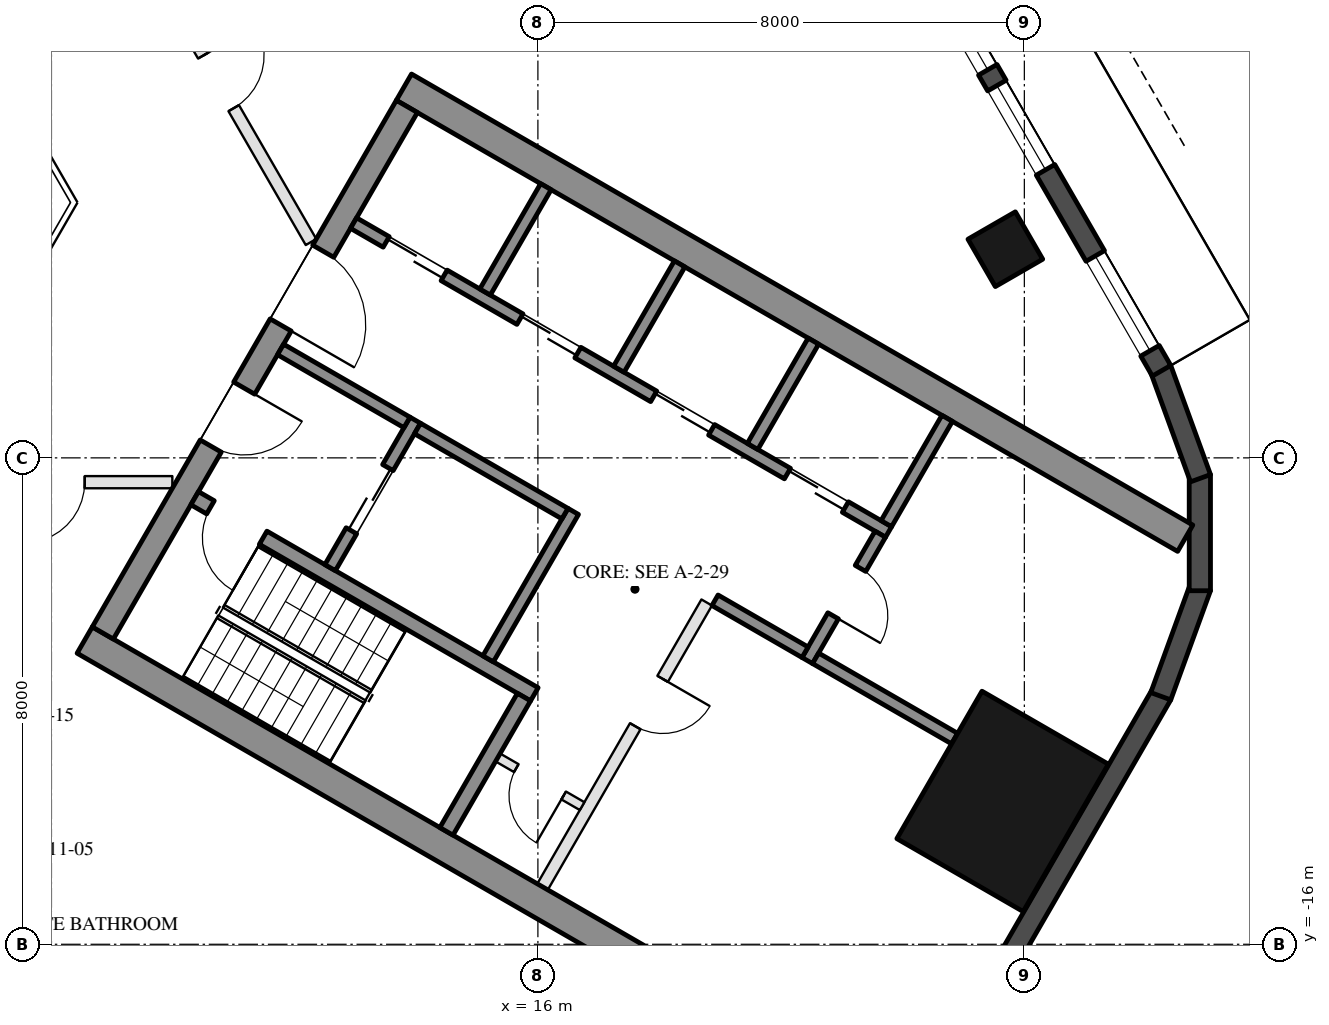
"""IFC4 building model, lengths in metres.
Left out: names, types, materials, properties, quantities, classifications, styles, units other than length and angle.
Written with IfcOpenShell. Run it as: python <this file> out.ifc"""

import sys

from ifc_helpers import new_model, si_unit, direction, frame, frame_2d, origin, origin_2d, place, context, subcontext, project, spatial, rectangle, hollow_rectangle, extrude, element, fill, save


model = new_model("IFC4")
c1 = context("Model", 3, precision=1e-05, world=origin(), true_north=direction((0.0, 1.0)))
c2 = subcontext(c1, "Body", "Model", "MODEL_VIEW")
j1 = project(units=[si_unit("LENGTHUNIT", "METRE"), si_unit("PLANEANGLEUNIT", "RADIAN")], contexts=[c1])
p1 = place(None, origin())
s1 = spatial("IfcSite", under=j1, at=p1, CompositionType="ELEMENT")
p2 = place(p1, origin())
s2 = spatial("IfcBuilding", under=s1, at=p2, CompositionType="ELEMENT")
p3 = place(p2, frame((0.0, 0.0, 127.9)))
s3 = spatial("IfcBuildingStorey", under=s2, at=p3, CompositionType="ELEMENT", Elevation=127.9)
p4 = place(p3, frame((23.688, -4.568, 0.0), z_axis=(0.0, 0.0, 1.0), x_axis=(-0.5, 0.866025403784, 0.0)))
e1 = element("IfcColumn", 1, at=p4, inside=s3, PredefinedType="COLUMN", context=c2, shape_type="SweptSolid", body=[
    extrude(hollow_rectangle(XDim=0.9, YDim=0.9, WallThickness=0.04, at=origin_2d()), origin(), (0.0, 0.0, 1.0), 3.7),
])
p5 = place(p3, frame((23.643, -13.65, 0.0), z_axis=(0.0, 0.0, 1.0), x_axis=(0.5, 0.866025403784, 0.0)))
e2 = element("IfcColumn", 2, at=p5, inside=s3, PredefinedType="COLUMN", context=c2, shape_type="SweptSolid", body=[
    extrude(hollow_rectangle(XDim=2.8, YDim=2.4, WallThickness=0.07, at=origin_2d()), origin(), (0.0, 0.0, 1.0), 3.7),
])
p6 = place(p3, frame((23.427, -16.792, 0.0), z_axis=(0.0, 0.0, 1.0), x_axis=(0.500018773155, 0.866014564827, 0.0)))
e3 = element("IfcWall", 3, at=p6, inside=s3, PredefinedType="SOLIDWALL", context=c2, shape_type="SweptSolid", body=[
    extrude(rectangle(XDim=5.658, YDim=0.35, at=frame_2d((2.829, 0.0))), origin(), (0.0, 0.0, 1.0), 3.45),
])
for number, where, z_axis, x_axis in (
    (4, (26.244, -11.92, 0.0), (0.0, 0.0, 1.0), (0.342, 0.94, 0.0)),
    (5, (26.886, -10.185, 0.0), (0.0, 0.0, 1.0), (0.0, 1.0, 0.0)),
    (6, (26.897, -8.335, 0.0), (0.0, 0.0, 1.0), (-0.342, 0.94, 0.0)),
):
    element("IfcWall", number, at=place(p3, frame(where, z_axis=z_axis, x_axis=x_axis)), inside=s3, PredefinedType="SOLIDWALL", context=c2, shape_type="SweptSolid", body=[
        extrude(rectangle(XDim=1.91, YDim=0.35, at=frame_2d((0.955, 0.0))), origin(), (0.0, 0.0, 1.0), 3.45),
    ])
p7 = place(p3, frame((26.257, -6.567, 0.0), z_axis=(0.0, 0.0, 1.0), x_axis=(-0.500023526245, 0.866011820475, 0.0)))
e7 = element("IfcWall", 7, at=p7, inside=s3, PredefinedType="SOLIDWALL", context=c2, shape_type="SweptSolid", body=[
    extrude(rectangle(XDim=11.816, YDim=0.35, at=frame_2d((5.908, 0.0))), origin(), (0.0, 0.0, 1.0), 3.45),
])
p8 = place(p7, frame((0.38, 0.0, 0.3)))
e8 = element("IfcOpeningElement", 8, at=p8, cuts=e7, PredefinedType="OPENING", context=c2, shape_type="SweptSolid", body=[
    extrude(rectangle(XDim=1.8, YDim=2.65, at=frame_2d((0.9, 1.325))), frame((0.0, 0.185, 0.0), z_axis=(0.0, -1.0, 0.0), x_axis=(1.0, 0.0, 0.0)), (0.0, 0.0, 1.0), 0.37),
])
p9 = place(p7, frame((7.716, 0.0, 0.0)))
e9 = element("IfcOpeningElement", 9, at=p9, cuts=e7, PredefinedType="OPENING", context=c2, shape_type="SweptSolid", body=[
    extrude(rectangle(XDim=2.4, YDim=2.4, at=frame_2d((1.2, 1.2))), frame((0.0, 0.185, 0.0), z_axis=(0.0, -1.0, 0.0), x_axis=(1.0, 0.0, 0.0)), (0.0, 0.0, 1.0), 0.37),
])
p10 = place(p7, frame((3.816, 0.0, 0.3)))
e10 = element("IfcOpeningElement", 10, at=p10, cuts=e7, PredefinedType="OPENING", context=c2, shape_type="SweptSolid", body=[
    extrude(rectangle(XDim=1.6, YDim=2.65, at=frame_2d((0.8, 1.325))), frame((0.0, 0.185, 0.0), z_axis=(0.0, -1.0, 0.0), x_axis=(1.0, 0.0, 0.0)), (0.0, 0.0, 1.0), 0.37),
])
p11 = place(p7, frame((5.716, 0.0, 0.3)))
e11 = element("IfcOpeningElement", 11, at=p11, cuts=e7, PredefinedType="OPENING", context=c2, shape_type="SweptSolid", body=[
    extrude(rectangle(XDim=1.6, YDim=2.65, at=frame_2d((0.8, 1.325))), frame((0.0, 0.185, 0.0), z_axis=(0.0, -1.0, 0.0), x_axis=(1.0, 0.0, 0.0)), (0.0, 0.0, 1.0), 0.37),
])
for number, where, z_axis, x_axis in (
    (12, (8.547, -10.997, 0.0), (0.0, 0.0, 1.0), (0.866, -0.5, 0.0)),
    (13, (13.797, -1.903, 0.0), (0.0, 0.0, 1.0), (0.866, -0.5, 0.0)),
):
    element("IfcWall", number, at=place(p3, frame(where, z_axis=z_axis, x_axis=x_axis)), inside=s3, PredefinedType="SHEAR", context=c2, shape_type="SweptSolid", body=[
        extrude(rectangle(XDim=14.837, YDim=0.5, at=frame_2d((7.418, 0.0))), origin(), (0.0, 0.0, 1.0), 3.45),
    ])
p12 = place(p3, frame((8.845, -10.88, 0.0), z_axis=(0.0, 0.0, 1.0), x_axis=(0.500004234368, 0.866022959057, 0.0)))
e14 = element("IfcWall", 14, at=p12, inside=s3, PredefinedType="SHEAR", context=c2, shape_type="SweptSolid", body=[
    extrude(rectangle(XDim=10.0, YDim=0.4, at=frame_2d((5.0, 0.0))), origin(), (0.0, 0.0, 1.0), 3.45),
])
p13 = place(p12, frame((3.55, 0.0, 0.0)))
e15 = element("IfcOpeningElement", 15, at=p13, cuts=e14, PredefinedType="OPENING", context=c2, shape_type="SweptSolid", body=[
    extrude(rectangle(XDim=1.1, YDim=2.1, at=frame_2d((0.55, 1.05))), frame((0.0, 0.21, 0.0), z_axis=(0.0, -1.0, 0.0), x_axis=(1.0, 0.0, 0.0)), (0.0, 0.0, 1.0), 0.42),
])
p14 = place(p12, frame((5.85, 0.0, 0.0)))
e16 = element("IfcOpeningElement", 16, at=p14, cuts=e14, PredefinedType="OPENING", context=c2, shape_type="SweptSolid", body=[
    extrude(rectangle(XDim=1.4, YDim=2.1, at=frame_2d((0.7, 1.05))), frame((0.0, 0.21, 0.0), z_axis=(0.0, -1.0, 0.0), x_axis=(1.0, 0.0, 0.0)), (0.0, 0.0, 1.0), 0.42),
])
p15 = place(p3, frame((10.356, -8.664, 0.0), z_axis=(0.0, 0.0, 1.0), x_axis=(0.866028629588, -0.499994412703, 0.0)))
e17 = element("IfcWall", 17, at=p15, inside=s3, PredefinedType="SHEAR", context=c2, shape_type="SweptSolid", body=[
    extrude(rectangle(XDim=6.45, YDim=0.25, at=frame_2d((3.225, 0.0))), origin(), (0.0, 0.0, 1.0), 3.45),
])
p16 = place(p15, frame((0.3, 0.0, 0.0)))
e18 = element("IfcOpeningElement", 18, at=p16, cuts=e17, PredefinedType="OPENING", context=c2, shape_type="SweptSolid", body=[
    extrude(rectangle(XDim=1.0, YDim=2.1, at=frame_2d((0.5, 1.05))), frame((0.0, 0.135, 0.0), z_axis=(0.0, -1.0, 0.0), x_axis=(1.0, 0.0, 0.0)), (0.0, 0.0, 1.0), 0.27),
])
p17 = place(p3, frame((14.496, -14.143, 0.0), z_axis=(0.0, 0.0, 1.0), x_axis=(0.500062241894, 0.865989465428, 0.0)))
e19 = element("IfcWall", 19, at=p17, inside=s3, PredefinedType="SHEAR", context=c2, shape_type="SweptSolid", body=[
    extrude(rectangle(XDim=2.55, YDim=0.25, at=frame_2d((1.275, 0.0))), origin(), (0.0, 0.0, 1.0), 3.45),
])
p18 = place(p3, frame((15.181, -11.305, 0.0), z_axis=(0.0, 0.0, 1.0), x_axis=(0.49994636267, 0.866056369097, 0.0)))
e20 = element("IfcWall", 20, at=p18, inside=s3, PredefinedType="SHEAR", context=c2, shape_type="SweptSolid", body=[
    extrude(rectangle(XDim=2.8, YDim=0.2, at=frame_2d((1.4, 0.0))), origin(), (0.0, 0.0, 1.0), 3.45),
])
p19 = place(p3, frame((12.583, -9.805, 0.0), z_axis=(0.0, 0.0, 1.0), x_axis=(0.49994636267, 0.866056369097, 0.0)))
e21 = element("IfcWall", 21, at=p19, inside=s3, PredefinedType="SHEAR", context=c2, shape_type="SweptSolid", body=[
    extrude(rectangle(XDim=2.8, YDim=0.2, at=frame_2d((1.4, 0.0))), origin(), (0.0, 0.0, 1.0), 3.45),
])
p20 = place(p19, frame((0.7, 0.0, 0.0)))
e22 = element("IfcOpeningElement", 22, at=p20, cuts=e21, PredefinedType="OPENING", context=c2, shape_type="SweptSolid", body=[
    extrude(rectangle(XDim=1.2, YDim=2.1, at=frame_2d((0.6, 1.05))), frame((0.0, 0.11, 0.0), z_axis=(0.0, -1.0, 0.0), x_axis=(1.0, 0.0, 0.0)), (0.0, 0.0, 1.0), 0.22),
])
p21 = place(p3, frame((11.768, -6.217, 0.0), z_axis=(0.0, 0.0, 1.0), x_axis=(0.866050077142, -0.499957262057, 0.0)))
e23 = element("IfcWall", 23, at=p21, inside=s3, PredefinedType="SHEAR", context=c2, shape_type="SweptSolid", body=[
    extrude(rectangle(XDim=2.4, YDim=0.2, at=frame_2d((1.2, 0.0))), origin(), (0.0, 0.0, 1.0), 3.45),
])
p22 = place(p3, frame((14.02, -7.517, 0.0), z_axis=(0.0, 0.0, 1.0), x_axis=(0.866034573852, -0.49998411664, 0.0)))
e24 = element("IfcWall", 24, at=p22, inside=s3, PredefinedType="SHEAR", context=c2, shape_type="SweptSolid", body=[
    extrude(rectangle(XDim=2.8, YDim=0.2, at=frame_2d((1.4, 0.0))), origin(), (0.0, 0.0, 1.0), 3.45),
])
p23 = place(p3, frame((12.968, -4.138, 0.0), z_axis=(0.0, 0.0, 1.0), x_axis=(0.866028328073, -0.49999493495, 0.0)))
e25 = element("IfcWall", 25, at=p23, inside=s3, PredefinedType="SHEAR", context=c2, shape_type="SweptSolid", body=[
    extrude(rectangle(XDim=10.16, YDim=0.2, at=frame_2d((5.08, 0.0))), origin(), (0.0, 0.0, 1.0), 3.45),
])
p24 = place(p23, frame((0.62, 0.0, 0.0)))
e26 = element("IfcOpeningElement", 26, at=p24, cuts=e25, PredefinedType="OPENING", context=c2, shape_type="SweptSolid", body=[
    extrude(rectangle(XDim=1.1, YDim=2.1, at=frame_2d((0.55, 1.05))), frame((0.0, 0.11, 0.0), z_axis=(0.0, -1.0, 0.0), x_axis=(1.0, 0.0, 0.0)), (0.0, 0.0, 1.0), 0.22),
])
p25 = place(p23, frame((3.16, 0.0, 0.0)))
e27 = element("IfcOpeningElement", 27, at=p25, cuts=e25, PredefinedType="OPENING", context=c2, shape_type="SweptSolid", body=[
    extrude(rectangle(XDim=1.1, YDim=2.1, at=frame_2d((0.55, 1.05))), frame((0.0, 0.11, 0.0), z_axis=(0.0, -1.0, 0.0), x_axis=(1.0, 0.0, 0.0)), (0.0, 0.0, 1.0), 0.22),
])
p26 = place(p23, frame((5.7, 0.0, 0.0)))
e28 = element("IfcOpeningElement", 28, at=p26, cuts=e25, PredefinedType="OPENING", context=c2, shape_type="SweptSolid", body=[
    extrude(rectangle(XDim=1.1, YDim=2.1, at=frame_2d((0.55, 1.05))), frame((0.0, 0.11, 0.0), z_axis=(0.0, -1.0, 0.0), x_axis=(1.0, 0.0, 0.0)), (0.0, 0.0, 1.0), 0.22),
])
p27 = place(p23, frame((8.24, 0.0, 0.0)))
e29 = element("IfcOpeningElement", 29, at=p27, cuts=e25, PredefinedType="OPENING", context=c2, shape_type="SweptSolid", body=[
    extrude(rectangle(XDim=1.1, YDim=2.1, at=frame_2d((0.55, 1.05))), frame((0.0, 0.11, 0.0), z_axis=(0.0, -1.0, 0.0), x_axis=(1.0, 0.0, 0.0)), (0.0, 0.0, 1.0), 0.22),
])
p28 = place(p3, frame((20.43, -11.333, 0.0), z_axis=(0.0, 0.0, 1.0), x_axis=(0.500001309137, 0.866024647952, 0.0)))
e30 = element("IfcWall", 30, at=p28, inside=s3, PredefinedType="SHEAR", context=c2, shape_type="SweptSolid", body=[
    extrude(rectangle(XDim=2.4, YDim=0.2, at=frame_2d((1.2, 0.0))), origin(), (0.0, 0.0, 1.0), 3.45),
])
p29 = place(p28, frame((0.85, 0.0, 0.0)))
e31 = element("IfcOpeningElement", 31, at=p29, cuts=e30, PredefinedType="OPENING", context=c2, shape_type="SweptSolid", body=[
    extrude(rectangle(XDim=0.9, YDim=2.1, at=frame_2d((0.45, 1.05))), frame((0.0, 0.11, 0.0), z_axis=(0.0, -1.0, 0.0), x_axis=(1.0, 0.0, 0.0)), (0.0, 0.0, 1.0), 0.22),
])
p30 = place(p3, frame((18.913, -10.342, 0.0), z_axis=(0.0, 0.0, 1.0), x_axis=(0.866038183914, -0.499977863513, 0.0)))
e32 = element("IfcWall", 32, at=p30, inside=s3, PredefinedType="SHEAR", context=c2, shape_type="SweptSolid", body=[
    extrude(rectangle(XDim=1.71, YDim=0.2, at=frame_2d((0.855, 0.0))), origin(), (0.0, 0.0, 1.0), 3.45),
])
for number, where, z_axis, x_axis in (
    (33, (15.131, -5.272, 0.0), (0.0, 0.0, 1.0), (0.5, 0.866, 0.0)),
    (34, (17.331, -6.542, 0.0), (0.0, 0.0, 1.0), (0.5, 0.866, 0.0)),
    (35, (19.531, -7.812, 0.0), (0.0, 0.0, 1.0), (0.5, 0.866, 0.0)),
    (36, (21.73, -9.082, 0.0), (0.0, 0.0, 1.0), (0.5, 0.866, 0.0)),
):
    element("IfcWall", number, at=place(p3, frame(where, z_axis=z_axis, x_axis=x_axis)), inside=s3, PredefinedType="SHEAR", context=c2, shape_type="SweptSolid", body=[
        extrude(rectangle(XDim=2.0, YDim=0.2, at=frame_2d((1.0, 0.0))), origin(), (0.0, 0.0, 1.0), 3.45),
    ])
p31 = place(p3, frame((20.567, -11.297, 0.0), z_axis=(0.0, 0.0, 1.0), x_axis=(0.866060851709, -0.499938597367, 0.0)))
e37 = element("IfcWall", 37, at=p31, inside=s3, PredefinedType="SHEAR", context=c2, shape_type="SweptSolid", body=[
    extrude(rectangle(XDim=2.64, YDim=0.2, at=frame_2d((1.32, 0.0))), origin(), (0.0, 0.0, 1.0), 3.45),
])
p32 = place(p3, frame((16.076, -15.055, 0.0), z_axis=(0.0, 0.0, 1.0), x_axis=(0.499995103361, 0.866028230842, 0.0)))
e38 = element("IfcWall", 38, at=p32, inside=s3, PredefinedType="PARTITIONING", context=c2, shape_type="SweptSolid", body=[
    extrude(rectangle(XDim=5.4, YDim=0.2, at=frame_2d((2.7, 0.0))), origin(), (0.0, 0.0, 1.0), 3.45),
])
p33 = place(p32, frame((3.05, 0.0, 0.0)))
e39 = element("IfcOpeningElement", 39, at=p33, cuts=e38, PredefinedType="OPENING", context=c2, shape_type="SweptSolid", body=[
    extrude(rectangle(XDim=0.9, YDim=2.1, at=frame_2d((0.45, 1.05))), frame((0.0, 0.11, 0.0), z_axis=(0.0, -1.0, 0.0), x_axis=(1.0, 0.0, 0.0)), (0.0, 0.0, 1.0), 0.22),
])
p34 = place(p3, frame((15.342, -12.928, 0.0), z_axis=(0.0, 0.0, 1.0), x_axis=(0.865989903783, -0.500061482766, 0.0)))
e40 = element("IfcWall", 40, at=p34, inside=s3, PredefinedType="PARTITIONING", context=c2, shape_type="SweptSolid", body=[
    extrude(rectangle(XDim=1.6, YDim=0.15, at=frame_2d((0.8, 0.0))), origin(), (0.0, 0.0, 1.0), 3.45),
])
p35 = place(p34, frame((0.35, 0.0, 0.0)))
e41 = element("IfcOpeningElement", 41, at=p35, cuts=e40, PredefinedType="OPENING", context=c2, shape_type="SweptSolid", body=[
    extrude(rectangle(XDim=0.9, YDim=2.1, at=frame_2d((0.45, 1.05))), frame((0.0, 0.085, 0.0), z_axis=(0.0, -1.0, 0.0), x_axis=(1.0, 0.0, 0.0)), (0.0, 0.0, 1.0), 0.17),
])
p36 = place(p3, frame((9.988, -8.4, 0.0), z_axis=(0.0, 0.0, 1.0), x_axis=(-1.0, 0.0, 0.0)))
e42 = element("IfcWall", 42, at=p36, inside=s3, PredefinedType="PARTITIONING", context=c2, shape_type="SweptSolid", body=[
    extrude(rectangle(XDim=3.883, YDim=0.2, at=frame_2d((1.941, 0.0))), origin(), (0.0, 0.0, 1.0), 2.76),
])
p37 = place(p36, frame((1.441, 0.0, 0.0)))
e43 = element("IfcOpeningElement", 43, at=p37, cuts=e42, PredefinedType="OPENING", context=c2, shape_type="SweptSolid", body=[
    extrude(rectangle(XDim=1.0, YDim=2.1, at=frame_2d((0.5, 1.05))), frame((0.0, 0.11, 0.0), z_axis=(0.0, -1.0, 0.0), x_axis=(1.0, 0.0, 0.0)), (0.0, 0.0, 1.0), 0.22),
])
p38 = place(p3, frame((9.226, 0.819, 0.0), z_axis=(0.0, 0.0, 1.0), x_axis=(0.500031571837, -0.866007175009, 0.0)))
e44 = element("IfcWall", 44, at=p38, inside=s3, PredefinedType="PARTITIONING", context=c2, shape_type="SweptSolid", body=[
    extrude(rectangle(XDim=6.084, YDim=0.2, at=frame_2d((3.042, 0.0))), origin(), (0.0, 0.0, 1.0), 2.76),
])
p39 = place(p38, frame((2.542, 0.0, 0.0)))
e45 = element("IfcOpeningElement", 45, at=p39, cuts=e44, PredefinedType="OPENING", context=c2, shape_type="SweptSolid", body=[
    extrude(rectangle(XDim=1.0, YDim=2.1, at=frame_2d((0.5, 1.05))), frame((0.0, 0.11, 0.0), z_axis=(0.0, -1.0, 0.0), x_axis=(1.0, 0.0, 0.0)), (0.0, 0.0, 1.0), 0.22),
])
p40 = place(p8, origin())
e46 = element("IfcWindow", 46, at=p40, inside=s3, PartitioningType="SINGLE_PANEL", PredefinedType="WINDOW", context=c2, shape_type="SweptSolid", body=[
    extrude(rectangle(XDim=1.8, YDim=2.65, at=frame_2d((0.9, 1.325))), frame((0.0, 0.03, 0.0), z_axis=(0.0, -1.0, 0.0), x_axis=(1.0, 0.0, 0.0)), (0.0, 0.0, 1.0), 0.06),
])
fill(e8, e46)
p41 = place(p10, origin())
e47 = element("IfcWindow", 47, at=p41, inside=s3, PartitioningType="SINGLE_PANEL", PredefinedType="WINDOW", context=c2, shape_type="SweptSolid", body=[
    extrude(rectangle(XDim=1.6, YDim=2.65, at=frame_2d((0.8, 1.325))), frame((0.0, 0.03, 0.0), z_axis=(0.0, -1.0, 0.0), x_axis=(1.0, 0.0, 0.0)), (0.0, 0.0, 1.0), 0.06),
])
fill(e10, e47)
p42 = place(p11, origin())
e48 = element("IfcWindow", 48, at=p42, inside=s3, PartitioningType="SINGLE_PANEL", PredefinedType="WINDOW", context=c2, shape_type="SweptSolid", body=[
    extrude(rectangle(XDim=1.6, YDim=2.65, at=frame_2d((0.8, 1.325))), frame((0.0, 0.03, 0.0), z_axis=(0.0, -1.0, 0.0), x_axis=(1.0, 0.0, 0.0)), (0.0, 0.0, 1.0), 0.06),
])
fill(e11, e48)
p43 = place(p20, origin())
e49 = element("IfcDoor", 49, at=p43, inside=s3, OperationType="DOUBLE_DOOR_SLIDING", PredefinedType="DOOR", context=c2, shape_type="SweptSolid", body=[
    extrude(rectangle(XDim=1.2, YDim=2.1, at=frame_2d((0.6, 1.05))), frame((0.0, 0.025, 0.0), z_axis=(0.0, -1.0, 0.0), x_axis=(1.0, 0.0, 0.0)), (0.0, 0.0, 1.0), 0.05),
])
fill(e22, e49)
p44 = place(p35, frame((0.9, 0.0, 0.0), z_axis=(0.0, 0.0, 1.0), x_axis=(-1.0, 0.0, 0.0)))
e50 = element("IfcDoor", 50, at=p44, inside=s3, OperationType="SINGLE_SWING_LEFT", PredefinedType="DOOR", context=c2, shape_type="SweptSolid", body=[
    extrude(rectangle(XDim=0.9, YDim=2.1, at=frame_2d((0.45, 1.05))), frame((0.0, 0.025, 0.0), z_axis=(0.0, -1.0, 0.0), x_axis=(1.0, 0.0, 0.0)), (0.0, 0.0, 1.0), 0.05),
])
fill(e41, e50)
p45 = place(p24, origin())
e51 = element("IfcDoor", 51, at=p45, inside=s3, OperationType="DOUBLE_DOOR_SLIDING", PredefinedType="DOOR", context=c2, shape_type="SweptSolid", body=[
    extrude(rectangle(XDim=1.1, YDim=2.1, at=frame_2d((0.55, 1.05))), frame((0.0, 0.025, 0.0), z_axis=(0.0, -1.0, 0.0), x_axis=(1.0, 0.0, 0.0)), (0.0, 0.0, 1.0), 0.05),
])
fill(e26, e51)
p46 = place(p25, origin())
e52 = element("IfcDoor", 52, at=p46, inside=s3, OperationType="DOUBLE_DOOR_SLIDING", PredefinedType="DOOR", context=c2, shape_type="SweptSolid", body=[
    extrude(rectangle(XDim=1.1, YDim=2.1, at=frame_2d((0.55, 1.05))), frame((0.0, 0.025, 0.0), z_axis=(0.0, -1.0, 0.0), x_axis=(1.0, 0.0, 0.0)), (0.0, 0.0, 1.0), 0.05),
])
fill(e27, e52)
p47 = place(p26, origin())
e53 = element("IfcDoor", 53, at=p47, inside=s3, OperationType="DOUBLE_DOOR_SLIDING", PredefinedType="DOOR", context=c2, shape_type="SweptSolid", body=[
    extrude(rectangle(XDim=1.1, YDim=2.1, at=frame_2d((0.55, 1.05))), frame((0.0, 0.025, 0.0), z_axis=(0.0, -1.0, 0.0), x_axis=(1.0, 0.0, 0.0)), (0.0, 0.0, 1.0), 0.05),
])
fill(e28, e53)
p48 = place(p27, origin())
e54 = element("IfcDoor", 54, at=p48, inside=s3, OperationType="DOUBLE_DOOR_SLIDING", PredefinedType="DOOR", context=c2, shape_type="SweptSolid", body=[
    extrude(rectangle(XDim=1.1, YDim=2.1, at=frame_2d((0.55, 1.05))), frame((0.0, 0.025, 0.0), z_axis=(0.0, -1.0, 0.0), x_axis=(1.0, 0.0, 0.0)), (0.0, 0.0, 1.0), 0.05),
])
fill(e29, e54)
p49 = place(p29, frame((0.9, 0.0, 0.0), z_axis=(0.0, 0.0, 1.0), x_axis=(-1.0, 0.0, 0.0)))
e55 = element("IfcDoor", 55, at=p49, inside=s3, OperationType="SINGLE_SWING_RIGHT", PredefinedType="DOOR", context=c2, shape_type="SweptSolid", body=[
    extrude(rectangle(XDim=0.9, YDim=2.1, at=frame_2d((0.45, 1.05))), frame((0.0, 0.025, 0.0), z_axis=(0.0, -1.0, 0.0), x_axis=(1.0, 0.0, 0.0)), (0.0, 0.0, 1.0), 0.05),
])
fill(e31, e55)
p50 = place(p33, frame((0.9, 0.0, 0.0), z_axis=(0.0, 0.0, 1.0), x_axis=(-1.0, 0.0, 0.0)))
e56 = element("IfcDoor", 56, at=p50, inside=s3, OperationType="SINGLE_SWING_LEFT", PredefinedType="DOOR", context=c2, shape_type="SweptSolid", body=[
    extrude(rectangle(XDim=0.9, YDim=2.1, at=frame_2d((0.45, 1.05))), frame((0.0, 0.025, 0.0), z_axis=(0.0, -1.0, 0.0), x_axis=(1.0, 0.0, 0.0)), (0.0, 0.0, 1.0), 0.05),
])
fill(e39, e56)
p51 = place(p13, frame((1.1, 0.0, 0.0), z_axis=(0.0, 0.0, 1.0), x_axis=(-1.0, 0.0, 0.0)))
e57 = element("IfcDoor", 57, at=p51, inside=s3, OperationType="SINGLE_SWING_LEFT", PredefinedType="DOOR", context=c2, shape_type="SweptSolid", body=[
    extrude(rectangle(XDim=1.1, YDim=2.1, at=frame_2d((0.55, 1.05))), frame((0.0, 0.025, 0.0), z_axis=(0.0, -1.0, 0.0), x_axis=(1.0, 0.0, 0.0)), (0.0, 0.0, 1.0), 0.05),
])
fill(e15, e57)
p52 = place(p14, frame((1.4, 0.0, 0.0), z_axis=(0.0, 0.0, 1.0), x_axis=(-1.0, 0.0, 0.0)))
e58 = element("IfcDoor", 58, at=p52, inside=s3, OperationType="DOUBLE_DOOR_SINGLE_SWING", PredefinedType="DOOR", context=c2, shape_type="SweptSolid", body=[
    extrude(rectangle(XDim=1.4, YDim=2.1, at=frame_2d((0.7, 1.05))), frame((0.0, 0.025, 0.0), z_axis=(0.0, -1.0, 0.0), x_axis=(1.0, 0.0, 0.0)), (0.0, 0.0, 1.0), 0.05),
])
fill(e16, e58)
p53 = place(p16, frame((1.0, 0.0, 0.0), z_axis=(0.0, 0.0, 1.0), x_axis=(-1.0, 0.0, 0.0)))
e59 = element("IfcDoor", 59, at=p53, inside=s3, OperationType="SINGLE_SWING_LEFT", PredefinedType="DOOR", context=c2, shape_type="SweptSolid", body=[
    extrude(rectangle(XDim=1.0, YDim=2.1, at=frame_2d((0.5, 1.05))), frame((0.0, 0.025, 0.0), z_axis=(0.0, -1.0, 0.0), x_axis=(1.0, 0.0, 0.0)), (0.0, 0.0, 1.0), 0.05),
])
fill(e18, e59)
p54 = place(p37, origin())
e60 = element("IfcDoor", 60, at=p54, inside=s3, OperationType="SINGLE_SWING_RIGHT", PredefinedType="DOOR", context=c2, shape_type="SweptSolid", body=[
    extrude(rectangle(XDim=1.0, YDim=2.1, at=frame_2d((0.5, 1.05))), frame((0.0, 0.025, 0.0), z_axis=(0.0, -1.0, 0.0), x_axis=(1.0, 0.0, 0.0)), (0.0, 0.0, 1.0), 0.05),
])
fill(e43, e60)
p55 = place(p39, origin())
e61 = element("IfcDoor", 61, at=p55, inside=s3, OperationType="SINGLE_SWING_LEFT", PredefinedType="DOOR", context=c2, shape_type="SweptSolid", body=[
    extrude(rectangle(XDim=1.0, YDim=2.1, at=frame_2d((0.5, 1.05))), frame((0.0, 0.025, 0.0), z_axis=(0.0, -1.0, 0.0), x_axis=(1.0, 0.0, 0.0)), (0.0, 0.0, 1.0), 0.05),
])
fill(e45, e61)
save(model, sys.argv[1])
